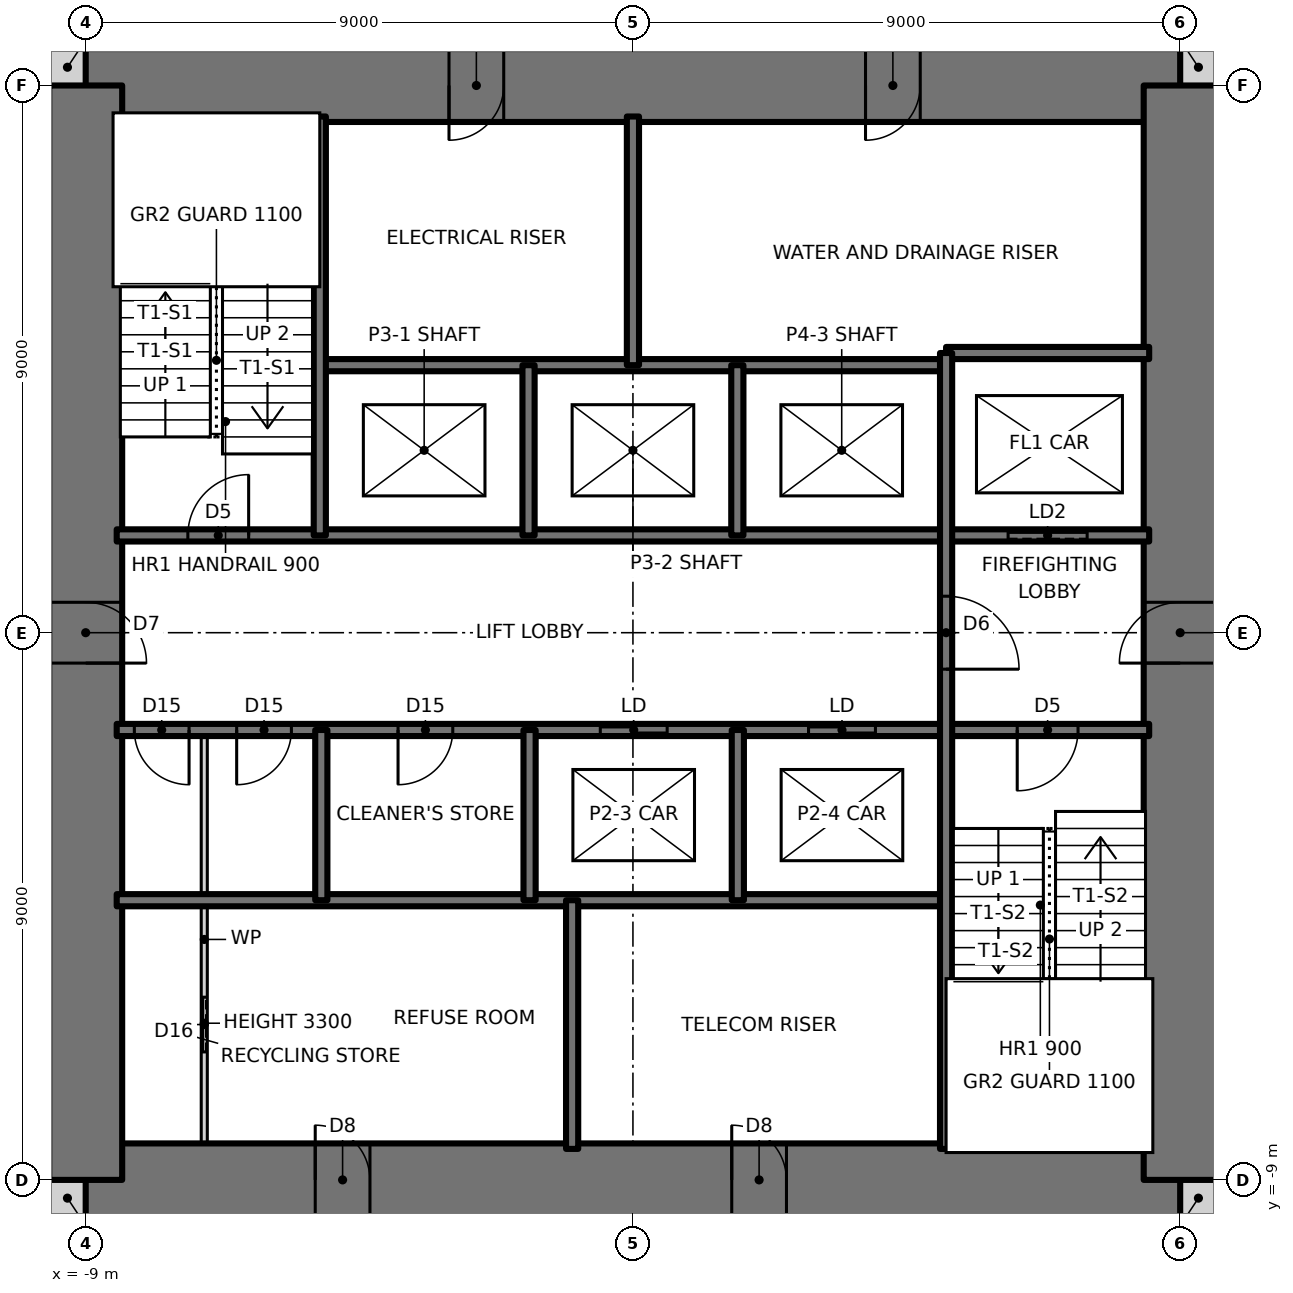
"""IFC4 building model, lengths in metres.
Left out: names, types, materials, properties, quantities, classifications, styles, units other than length and angle.
Written with IfcOpenShell. Run it as: python <this file> out.ifc"""

import sys

from ifc_helpers import new_model, si_unit, direction, frame, frame_2d, origin, place, context, subcontext, project, spatial, rectangle, extrude, element, fill, save


model = new_model("IFC4")
c1 = context("Model", 3, precision=1e-05, world=origin(), true_north=direction((0.0, 1.0)))
c2 = subcontext(c1, "Body", "Model", "MODEL_VIEW")
j1 = project(units=[si_unit("LENGTHUNIT", "METRE"), si_unit("PLANEANGLEUNIT", "RADIAN")], contexts=[c1])
p1 = place(None, origin())
s1 = spatial("IfcSite", under=j1, at=p1, CompositionType="ELEMENT")
p2 = place(p1, origin())
s2 = spatial("IfcBuilding", under=s1, at=p2, CompositionType="ELEMENT")
p3 = place(p2, frame((0.0, 0.0, 84.0)))
s3 = spatial("IfcBuildingStorey", under=s2, at=p3, CompositionType="ELEMENT", Elevation=84.0)
for number, where, z_axis, x_axis in (
    (1, (-9.6, -9.3, 0.0), (0.0, 0.0, 1.0), (1.0, 0.0, 0.0)),
    (2, (9.0, -9.3, 0.0), (0.0, 0.0, 1.0), (1.0, 0.0, 0.0)),
    (3, (9.0, 9.3, 0.0), (0.0, 0.0, 1.0), (1.0, 0.0, 0.0)),
    (4, (-9.6, 9.3, 0.0), (0.0, 0.0, 1.0), (1.0, 0.0, 0.0)),
):
    element("IfcWall", number, at=place(p3, frame(where, z_axis=z_axis, x_axis=x_axis)), inside=s3, PredefinedType="SOLIDWALL", context=c2, shape_type="SweptSolid", body=[
        extrude(rectangle(XDim=0.6, YDim=0.6, at=frame_2d((0.3, 0.0))), origin(), (0.0, 0.0, 1.0), 3.5),
    ])
p4 = place(p3, frame((-9.0, -9.0, 0.0), z_axis=(0.0, 0.0, 1.0), x_axis=(1.0, 0.0, 0.0)))
e5 = element("IfcWall", 5, at=p4, inside=s3, PredefinedType="SHEAR", context=c2, shape_type="SweptSolid", body=[
    extrude(rectangle(XDim=18.0, YDim=1.2, at=frame_2d((9.0, 0.0))), origin(), (0.0, 0.0, 1.0), 3.5),
])
p5 = place(p4, frame((3.775, 0.0, 0.0)))
e6 = element("IfcOpeningElement", 6, at=p5, cuts=e5, PredefinedType="OPENING", context=c2, shape_type="SweptSolid", body=[
    extrude(rectangle(XDim=0.9, YDim=2.1, at=frame_2d((0.45, 1.05))), frame((0.0, 0.61, 0.0), z_axis=(0.0, -1.0, 0.0), x_axis=(1.0, 0.0, 0.0)), (0.0, 0.0, 1.0), 1.22),
])
p6 = place(p4, frame((10.625, 0.0, 0.0)))
e7 = element("IfcOpeningElement", 7, at=p6, cuts=e5, PredefinedType="OPENING", context=c2, shape_type="SweptSolid", body=[
    extrude(rectangle(XDim=0.9, YDim=2.1, at=frame_2d((0.45, 1.05))), frame((0.0, 0.61, 0.0), z_axis=(0.0, -1.0, 0.0), x_axis=(1.0, 0.0, 0.0)), (0.0, 0.0, 1.0), 1.22),
])
p7 = place(p3, frame((9.0, 9.0, 0.0), z_axis=(0.0, 0.0, 1.0), x_axis=(-1.0, 0.0, 0.0)))
e8 = element("IfcWall", 8, at=p7, inside=s3, PredefinedType="SHEAR", context=c2, shape_type="SweptSolid", body=[
    extrude(rectangle(XDim=18.0, YDim=1.2, at=frame_2d((9.0, 0.0))), origin(), (0.0, 0.0, 1.0), 3.5),
])
p8 = place(p7, frame((11.125, 0.0, 0.0)))
e9 = element("IfcOpeningElement", 9, at=p8, cuts=e8, PredefinedType="OPENING", context=c2, shape_type="SweptSolid", body=[
    extrude(rectangle(XDim=0.9, YDim=2.1, at=frame_2d((0.45, 1.05))), frame((0.0, 0.61, 0.0), z_axis=(0.0, -1.0, 0.0), x_axis=(1.0, 0.0, 0.0)), (0.0, 0.0, 1.0), 1.22),
])
p9 = place(p7, frame((4.275, 0.0, 0.0)))
e10 = element("IfcOpeningElement", 10, at=p9, cuts=e8, PredefinedType="OPENING", context=c2, shape_type="SweptSolid", body=[
    extrude(rectangle(XDim=0.9, YDim=2.1, at=frame_2d((0.45, 1.05))), frame((0.0, 0.61, 0.0), z_axis=(0.0, -1.0, 0.0), x_axis=(1.0, 0.0, 0.0)), (0.0, 0.0, 1.0), 1.22),
])
p10 = place(p3, frame((9.0, -9.0, 0.0), z_axis=(0.0, 0.0, 1.0), x_axis=(0.0, 1.0, 0.0)))
e11 = element("IfcWall", 11, at=p10, inside=s3, PredefinedType="SHEAR", context=c2, shape_type="SweptSolid", body=[
    extrude(rectangle(XDim=18.0, YDim=1.2, at=frame_2d((9.0, 0.0))), origin(), (0.0, 0.0, 1.0), 3.5),
])
p11 = place(p10, frame((8.5, 0.0, 0.0)))
e12 = element("IfcOpeningElement", 12, at=p11, cuts=e11, PredefinedType="OPENING", context=c2, shape_type="SweptSolid", body=[
    extrude(rectangle(XDim=1.0, YDim=2.1, at=frame_2d((0.5, 1.05))), frame((0.0, 0.61, 0.0), z_axis=(0.0, -1.0, 0.0), x_axis=(1.0, 0.0, 0.0)), (0.0, 0.0, 1.0), 1.22),
])
p12 = place(p3, frame((-9.0, 9.0, 0.0), z_axis=(0.0, 0.0, 1.0), x_axis=(0.0, -1.0, 0.0)))
e13 = element("IfcWall", 13, at=p12, inside=s3, PredefinedType="SHEAR", context=c2, shape_type="SweptSolid", body=[
    extrude(rectangle(XDim=18.0, YDim=1.2, at=frame_2d((9.0, 0.0))), origin(), (0.0, 0.0, 1.0), 3.5),
])
p13 = place(p12, frame((8.5, 0.0, 0.0)))
e14 = element("IfcOpeningElement", 14, at=p13, cuts=e13, PredefinedType="OPENING", context=c2, shape_type="SweptSolid", body=[
    extrude(rectangle(XDim=1.0, YDim=2.1, at=frame_2d((0.5, 1.05))), frame((0.0, 0.61, 0.0), z_axis=(0.0, -1.0, 0.0), x_axis=(1.0, 0.0, 0.0)), (0.0, 0.0, 1.0), 1.22),
])
p14 = place(p3, frame((-8.49, -4.4, 0.0), z_axis=(0.0, 0.0, 1.0), x_axis=(1.0, 0.0, 0.0)))
e15 = element("IfcWall", 15, at=p14, inside=s3, PredefinedType="SOLIDWALL", context=c2, shape_type="SweptSolid", body=[
    extrude(rectangle(XDim=13.64, YDim=0.2, at=frame_2d((6.82, 0.0))), origin(), (0.0, 0.0, 1.0), 3.5),
])
p15 = place(p3, frame((-8.49, -1.6, 0.0), z_axis=(0.0, 0.0, 1.0), x_axis=(1.0, 0.0, 0.0)))
e16 = element("IfcWall", 16, at=p15, inside=s3, PredefinedType="SOLIDWALL", context=c2, shape_type="SweptSolid", body=[
    extrude(rectangle(XDim=16.98, YDim=0.2, at=frame_2d((8.49, 0.0))), origin(), (0.0, 0.0, 1.0), 3.5),
])
p16 = place(p15, frame((14.81, 0.0, 0.0)))
e17 = element("IfcOpeningElement", 17, at=p16, cuts=e16, PredefinedType="OPENING", context=c2, shape_type="SweptSolid", body=[
    extrude(rectangle(XDim=1.0, YDim=2.1, at=frame_2d((0.5, 1.05))), frame((0.0, 0.11, 0.0), z_axis=(0.0, -1.0, 0.0), x_axis=(1.0, 0.0, 0.0)), (0.0, 0.0, 1.0), 0.22),
])
p17 = place(p15, frame((1.973, 0.0, 0.0)))
e18 = element("IfcOpeningElement", 18, at=p17, cuts=e16, PredefinedType="OPENING", context=c2, shape_type="SweptSolid", body=[
    extrude(rectangle(XDim=0.9, YDim=2.1, at=frame_2d((0.45, 1.05))), frame((0.0, 0.11, 0.0), z_axis=(0.0, -1.0, 0.0), x_axis=(1.0, 0.0, 0.0)), (0.0, 0.0, 1.0), 0.22),
])
p18 = place(p15, frame((0.29, 0.0, 0.0)))
e19 = element("IfcOpeningElement", 19, at=p18, cuts=e16, PredefinedType="OPENING", context=c2, shape_type="SweptSolid", body=[
    extrude(rectangle(XDim=0.9, YDim=2.1, at=frame_2d((0.45, 1.05))), frame((0.0, 0.11, 0.0), z_axis=(0.0, -1.0, 0.0), x_axis=(1.0, 0.0, 0.0)), (0.0, 0.0, 1.0), 0.22),
])
p19 = place(p15, frame((4.627, 0.0, 0.0)))
e20 = element("IfcOpeningElement", 20, at=p19, cuts=e16, PredefinedType="OPENING", context=c2, shape_type="SweptSolid", body=[
    extrude(rectangle(XDim=0.9, YDim=2.1, at=frame_2d((0.45, 1.05))), frame((0.0, 0.11, 0.0), z_axis=(0.0, -1.0, 0.0), x_axis=(1.0, 0.0, 0.0)), (0.0, 0.0, 1.0), 0.22),
])
p20 = place(p15, frame((7.953, 0.0, 0.0)))
e21 = element("IfcOpeningElement", 21, at=p20, cuts=e16, PredefinedType="OPENING", context=c2, shape_type="SweptSolid", body=[
    extrude(rectangle(XDim=1.1, YDim=2.1, at=frame_2d((0.55, 1.05))), frame((0.0, 0.11, 0.0), z_axis=(0.0, -1.0, 0.0), x_axis=(1.0, 0.0, 0.0)), (0.0, 0.0, 1.0), 0.22),
])
p21 = place(p15, frame((11.378, 0.0, 0.0)))
e22 = element("IfcOpeningElement", 22, at=p21, cuts=e16, PredefinedType="OPENING", context=c2, shape_type="SweptSolid", body=[
    extrude(rectangle(XDim=1.1, YDim=2.1, at=frame_2d((0.55, 1.05))), frame((0.0, 0.11, 0.0), z_axis=(0.0, -1.0, 0.0), x_axis=(1.0, 0.0, 0.0)), (0.0, 0.0, 1.0), 0.22),
])
p22 = place(p3, frame((-8.49, 1.6, 0.0), z_axis=(0.0, 0.0, 1.0), x_axis=(1.0, 0.0, 0.0)))
e23 = element("IfcWall", 23, at=p22, inside=s3, PredefinedType="SOLIDWALL", context=c2, shape_type="SweptSolid", body=[
    extrude(rectangle(XDim=16.98, YDim=0.2, at=frame_2d((8.49, 0.0))), origin(), (0.0, 0.0, 1.0), 3.5),
])
p23 = place(p22, frame((1.17, 0.0, 0.0)))
e24 = element("IfcOpeningElement", 24, at=p23, cuts=e23, PredefinedType="OPENING", context=c2, shape_type="SweptSolid", body=[
    extrude(rectangle(XDim=1.0, YDim=2.1, at=frame_2d((0.5, 1.05))), frame((0.0, 0.11, 0.0), z_axis=(0.0, -1.0, 0.0), x_axis=(1.0, 0.0, 0.0)), (0.0, 0.0, 1.0), 0.22),
])
p24 = place(p22, frame((14.66, 0.0, 0.0)))
e25 = element("IfcOpeningElement", 25, at=p24, cuts=e23, PredefinedType="OPENING", context=c2, shape_type="SweptSolid", body=[
    extrude(rectangle(XDim=1.3, YDim=2.1, at=frame_2d((0.65, 1.05))), frame((0.0, 0.11, 0.0), z_axis=(0.0, -1.0, 0.0), x_axis=(1.0, 0.0, 0.0)), (0.0, 0.0, 1.0), 0.22),
])
p25 = place(p3, frame((-5.15, 4.4, 0.0), z_axis=(0.0, 0.0, 1.0), x_axis=(1.0, 0.0, 0.0)))
e26 = element("IfcWall", 26, at=p25, inside=s3, PredefinedType="SOLIDWALL", context=c2, shape_type="SweptSolid", body=[
    extrude(rectangle(XDim=10.3, YDim=0.2, at=frame_2d((5.15, 0.0))), origin(), (0.0, 0.0, 1.0), 3.5),
])
p26 = place(p3, frame((5.15, 4.6, 0.0), z_axis=(0.0, 0.0, 1.0), x_axis=(1.0, 0.0, 0.0)))
e27 = element("IfcWall", 27, at=p26, inside=s3, PredefinedType="SOLIDWALL", context=c2, shape_type="SweptSolid", body=[
    extrude(rectangle(XDim=3.34, YDim=0.2, at=frame_2d((1.67, 0.0))), origin(), (0.0, 0.0, 1.0), 3.5),
])
p27 = place(p3, frame((5.15, -8.49, 0.0), z_axis=(0.0, 0.0, 1.0), x_axis=(0.0, 1.0, 0.0)))
e28 = element("IfcWall", 28, at=p27, inside=s3, PredefinedType="SOLIDWALL", context=c2, shape_type="SweptSolid", body=[
    extrude(rectangle(XDim=13.09, YDim=0.2, at=frame_2d((6.545, 0.0))), origin(), (0.0, 0.0, 1.0), 3.5),
])
p28 = place(p27, frame((7.89, 0.0, 0.0)))
e29 = element("IfcOpeningElement", 29, at=p28, cuts=e28, PredefinedType="OPENING", context=c2, shape_type="SweptSolid", body=[
    extrude(rectangle(XDim=1.2, YDim=2.1, at=frame_2d((0.6, 1.05))), frame((0.0, 0.11, 0.0), z_axis=(0.0, -1.0, 0.0), x_axis=(1.0, 0.0, 0.0)), (0.0, 0.0, 1.0), 0.22),
])
for number, where, z_axis, x_axis in (
    (30, (1.725, -4.4, 0.0), (0.0, 0.0, 1.0), (0.0, 1.0, 0.0)),
    (31, (1.717, 1.6, 0.0), (0.0, 0.0, 1.0), (0.0, 1.0, 0.0)),
):
    element("IfcWall", number, at=place(p3, frame(where, z_axis=z_axis, x_axis=x_axis)), inside=s3, PredefinedType="SOLIDWALL", context=c2, shape_type="SweptSolid", body=[
        extrude(rectangle(XDim=2.8, YDim=0.2, at=frame_2d((1.4, 0.0))), origin(), (0.0, 0.0, 1.0), 3.5),
    ])
for number, where, z_axis, x_axis in (
    (32, (0.0, 4.4, 0.0), (0.0, 0.0, 1.0), (0.0, 1.0, 0.0)),
    (33, (-1.0, -8.49, 0.0), (0.0, 0.0, 1.0), (0.0, 1.0, 0.0)),
):
    element("IfcWall", number, at=place(p3, frame(where, z_axis=z_axis, x_axis=x_axis)), inside=s3, PredefinedType="SOLIDWALL", context=c2, shape_type="SweptSolid", body=[
        extrude(rectangle(XDim=4.09, YDim=0.2, at=frame_2d((2.045, 0.0))), origin(), (0.0, 0.0, 1.0), 3.5),
    ])
for number, where, z_axis, x_axis in (
    (34, (-1.7, -4.4, 0.0), (0.0, 0.0, 1.0), (0.0, 1.0, 0.0)),
    (35, (-1.717, 1.6, 0.0), (0.0, 0.0, 1.0), (0.0, 1.0, 0.0)),
    (36, (-5.125, -4.4, 0.0), (0.0, 0.0, 1.0), (0.0, 1.0, 0.0)),
):
    element("IfcWall", number, at=place(p3, frame(where, z_axis=z_axis, x_axis=x_axis)), inside=s3, PredefinedType="SOLIDWALL", context=c2, shape_type="SweptSolid", body=[
        extrude(rectangle(XDim=2.8, YDim=0.2, at=frame_2d((1.4, 0.0))), origin(), (0.0, 0.0, 1.0), 3.5),
    ])
p29 = place(p3, frame((-5.15, 1.6, 0.0), z_axis=(0.0, 0.0, 1.0), x_axis=(0.0, 1.0, 0.0)))
e37 = element("IfcWall", 37, at=p29, inside=s3, PredefinedType="SOLIDWALL", context=c2, shape_type="SweptSolid", body=[
    extrude(rectangle(XDim=6.89, YDim=0.2, at=frame_2d((3.445, 0.0))), origin(), (0.0, 0.0, 1.0), 3.5),
])
p30 = place(p3, frame((-7.05, -8.49, 0.0), z_axis=(0.0, 0.0, 1.0), x_axis=(0.0, 1.0, 0.0)))
e38 = element("IfcWall", 38, at=p30, inside=s3, PredefinedType="PARTITIONING", context=c2, shape_type="SweptSolid", body=[
    extrude(rectangle(XDim=6.89, YDim=0.1, at=frame_2d((3.445, 0.0))), origin(), (0.0, 0.0, 1.0), 3.3),
])
p31 = place(p30, frame((1.595, 0.0, 0.0)))
e39 = element("IfcOpeningElement", 39, at=p31, cuts=e38, PredefinedType="OPENING", context=c2, shape_type="SweptSolid", body=[
    extrude(rectangle(XDim=0.9, YDim=2.1, at=frame_2d((0.45, 1.05))), frame((0.0, 0.06, 0.0), z_axis=(0.0, -1.0, 0.0), x_axis=(1.0, 0.0, 0.0)), (0.0, 0.0, 1.0), 0.12),
])
p32 = place(p23, origin())
e40 = element("IfcDoor", 40, at=p32, inside=s3, OperationType="SINGLE_SWING_RIGHT", PredefinedType="DOOR", context=c2, shape_type="SweptSolid", body=[
    extrude(rectangle(XDim=1.0, YDim=2.1, at=frame_2d((0.5, 1.05))), frame((0.0, 0.025, 0.0), z_axis=(0.0, -1.0, 0.0), x_axis=(1.0, 0.0, 0.0)), (0.0, 0.0, 1.0), 0.05),
])
fill(e24, e40)
p33 = place(p16, frame((1.0, 0.0, 0.0), z_axis=(0.0, 0.0, 1.0), x_axis=(-1.0, 0.0, 0.0)))
e41 = element("IfcDoor", 41, at=p33, inside=s3, OperationType="SINGLE_SWING_RIGHT", PredefinedType="DOOR", context=c2, shape_type="SweptSolid", body=[
    extrude(rectangle(XDim=1.0, YDim=2.1, at=frame_2d((0.5, 1.05))), frame((0.0, 0.025, 0.0), z_axis=(0.0, -1.0, 0.0), x_axis=(1.0, 0.0, 0.0)), (0.0, 0.0, 1.0), 0.05),
])
fill(e17, e41)
p34 = place(p28, frame((1.2, 0.0, 0.0), z_axis=(0.0, 0.0, 1.0), x_axis=(-1.0, 0.0, 0.0)))
e42 = element("IfcDoor", 42, at=p34, inside=s3, OperationType="SINGLE_SWING_RIGHT", PredefinedType="DOOR", context=c2, shape_type="SweptSolid", body=[
    extrude(rectangle(XDim=1.2, YDim=2.1, at=frame_2d((0.6, 1.05))), frame((0.0, 0.025, 0.0), z_axis=(0.0, -1.0, 0.0), x_axis=(1.0, 0.0, 0.0)), (0.0, 0.0, 1.0), 0.05),
])
fill(e29, e42)
p35 = place(p17, frame((0.9, 0.0, 0.0), z_axis=(0.0, 0.0, 1.0), x_axis=(-1.0, 0.0, 0.0)))
e43 = element("IfcDoor", 43, at=p35, inside=s3, OperationType="SINGLE_SWING_RIGHT", PredefinedType="DOOR", context=c2, shape_type="SweptSolid", body=[
    extrude(rectangle(XDim=0.9, YDim=2.1, at=frame_2d((0.45, 1.05))), frame((0.0, 0.025, 0.0), z_axis=(0.0, -1.0, 0.0), x_axis=(1.0, 0.0, 0.0)), (0.0, 0.0, 1.0), 0.05),
])
fill(e18, e43)
p36 = place(p18, frame((0.9, 0.0, 0.0), z_axis=(0.0, 0.0, 1.0), x_axis=(-1.0, 0.0, 0.0)))
e44 = element("IfcDoor", 44, at=p36, inside=s3, OperationType="SINGLE_SWING_LEFT", PredefinedType="DOOR", context=c2, shape_type="SweptSolid", body=[
    extrude(rectangle(XDim=0.9, YDim=2.1, at=frame_2d((0.45, 1.05))), frame((0.0, 0.025, 0.0), z_axis=(0.0, -1.0, 0.0), x_axis=(1.0, 0.0, 0.0)), (0.0, 0.0, 1.0), 0.05),
])
fill(e19, e44)
p37 = place(p19, frame((0.9, 0.0, 0.0), z_axis=(0.0, 0.0, 1.0), x_axis=(-1.0, 0.0, 0.0)))
e45 = element("IfcDoor", 45, at=p37, inside=s3, OperationType="SINGLE_SWING_RIGHT", PredefinedType="DOOR", context=c2, shape_type="SweptSolid", body=[
    extrude(rectangle(XDim=0.9, YDim=2.1, at=frame_2d((0.45, 1.05))), frame((0.0, 0.025, 0.0), z_axis=(0.0, -1.0, 0.0), x_axis=(1.0, 0.0, 0.0)), (0.0, 0.0, 1.0), 0.05),
])
fill(e20, e45)
p38 = place(p31, origin())
e46 = element("IfcDoor", 46, at=p38, inside=s3, OperationType="SLIDING_TO_RIGHT", PredefinedType="DOOR", context=c2, shape_type="SweptSolid", body=[
    extrude(rectangle(XDim=0.9, YDim=2.1, at=frame_2d((0.45, 1.05))), frame((0.0, 0.025, 0.0), z_axis=(0.0, -1.0, 0.0), x_axis=(1.0, 0.0, 0.0)), (0.0, 0.0, 1.0), 0.05),
])
fill(e39, e46)
p39 = place(p13, origin())
e47 = element("IfcDoor", 47, at=p39, inside=s3, OperationType="SINGLE_SWING_RIGHT", PredefinedType="DOOR", context=c2, shape_type="SweptSolid", body=[
    extrude(rectangle(XDim=1.0, YDim=2.1, at=frame_2d((0.5, 1.05))), frame((0.0, 0.025, 0.0), z_axis=(0.0, -1.0, 0.0), x_axis=(1.0, 0.0, 0.0)), (0.0, 0.0, 1.0), 0.05),
])
fill(e14, e47)
p40 = place(p11, origin())
e48 = element("IfcDoor", 48, at=p40, inside=s3, OperationType="SINGLE_SWING_LEFT", PredefinedType="DOOR", context=c2, shape_type="SweptSolid", body=[
    extrude(rectangle(XDim=1.0, YDim=2.1, at=frame_2d((0.5, 1.05))), frame((0.0, 0.025, 0.0), z_axis=(0.0, -1.0, 0.0), x_axis=(1.0, 0.0, 0.0)), (0.0, 0.0, 1.0), 0.05),
])
fill(e12, e48)
p41 = place(p8, origin())
e49 = element("IfcDoor", 49, at=p41, inside=s3, OperationType="SINGLE_SWING_RIGHT", PredefinedType="DOOR", context=c2, shape_type="SweptSolid", body=[
    extrude(rectangle(XDim=0.9, YDim=2.1, at=frame_2d((0.45, 1.05))), frame((0.0, 0.025, 0.0), z_axis=(0.0, -1.0, 0.0), x_axis=(1.0, 0.0, 0.0)), (0.0, 0.0, 1.0), 0.05),
])
fill(e9, e49)
p42 = place(p9, origin())
e50 = element("IfcDoor", 50, at=p42, inside=s3, OperationType="SINGLE_SWING_RIGHT", PredefinedType="DOOR", context=c2, shape_type="SweptSolid", body=[
    extrude(rectangle(XDim=0.9, YDim=2.1, at=frame_2d((0.45, 1.05))), frame((0.0, 0.025, 0.0), z_axis=(0.0, -1.0, 0.0), x_axis=(1.0, 0.0, 0.0)), (0.0, 0.0, 1.0), 0.05),
])
fill(e10, e50)
p43 = place(p5, origin())
e51 = element("IfcDoor", 51, at=p43, inside=s3, OperationType="SINGLE_SWING_LEFT", PredefinedType="DOOR", context=c2, shape_type="SweptSolid", body=[
    extrude(rectangle(XDim=0.9, YDim=2.1, at=frame_2d((0.45, 1.05))), frame((0.0, 0.025, 0.0), z_axis=(0.0, -1.0, 0.0), x_axis=(1.0, 0.0, 0.0)), (0.0, 0.0, 1.0), 0.05),
])
fill(e6, e51)
p44 = place(p6, origin())
e52 = element("IfcDoor", 52, at=p44, inside=s3, OperationType="SINGLE_SWING_LEFT", PredefinedType="DOOR", context=c2, shape_type="SweptSolid", body=[
    extrude(rectangle(XDim=0.9, YDim=2.1, at=frame_2d((0.45, 1.05))), frame((0.0, 0.025, 0.0), z_axis=(0.0, -1.0, 0.0), x_axis=(1.0, 0.0, 0.0)), (0.0, 0.0, 1.0), 0.05),
])
fill(e7, e52)
p45 = place(p20, origin())
e53 = element("IfcDoor", 53, at=p45, inside=s3, OperationType="DOUBLE_DOOR_SLIDING", PredefinedType="DOOR", context=c2, shape_type="SweptSolid", body=[
    extrude(rectangle(XDim=1.1, YDim=2.1, at=frame_2d((0.55, 1.05))), frame((0.0, 0.025, 0.0), z_axis=(0.0, -1.0, 0.0), x_axis=(1.0, 0.0, 0.0)), (0.0, 0.0, 1.0), 0.05),
])
fill(e21, e53)
p46 = place(p21, origin())
e54 = element("IfcDoor", 54, at=p46, inside=s3, OperationType="DOUBLE_DOOR_SLIDING", PredefinedType="DOOR", context=c2, shape_type="SweptSolid", body=[
    extrude(rectangle(XDim=1.1, YDim=2.1, at=frame_2d((0.55, 1.05))), frame((0.0, 0.025, 0.0), z_axis=(0.0, -1.0, 0.0), x_axis=(1.0, 0.0, 0.0)), (0.0, 0.0, 1.0), 0.05),
])
fill(e22, e54)
p47 = place(p24, origin())
e55 = element("IfcDoor", 55, at=p47, inside=s3, OperationType="SLIDING_TO_LEFT", PredefinedType="DOOR", context=c2, shape_type="SweptSolid", body=[
    extrude(rectangle(XDim=1.3, YDim=2.1, at=frame_2d((0.65, 1.05))), frame((0.0, 0.025, 0.0), z_axis=(0.0, -1.0, 0.0), x_axis=(1.0, 0.0, 0.0)), (0.0, 0.0, 1.0), 0.05),
])
fill(e25, e55)
save(model, sys.argv[1])
